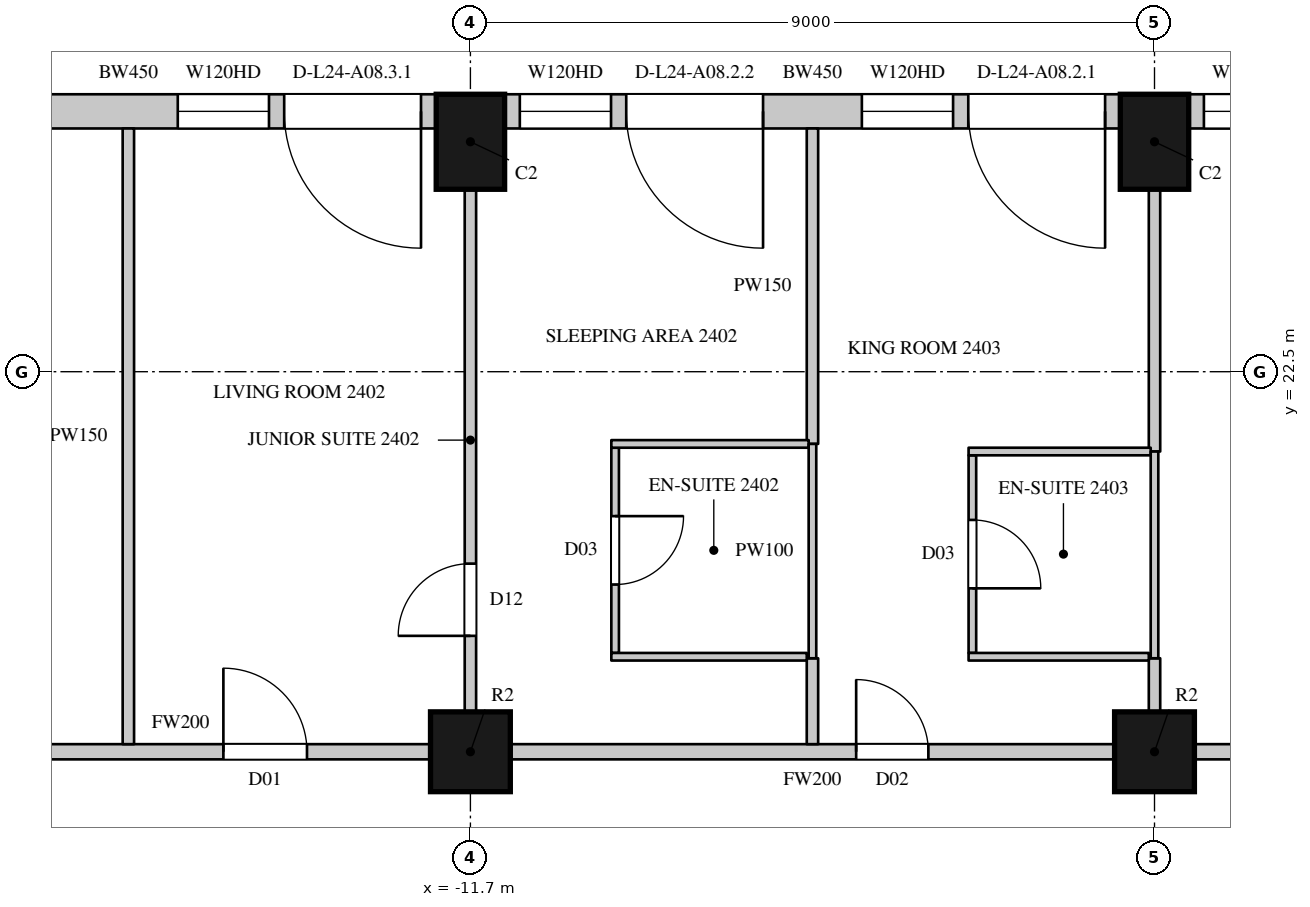
"""IFC4 building model, lengths in metres.
Left out: names, types, materials, properties, quantities, classifications, styles, units other than length and angle.
Written with IfcOpenShell. Run it as: python <this file> out.ifc"""

import sys

from ifc_helpers import new_model, si_unit, direction, frame, frame_2d, origin, origin_2d, place, context, subcontext, project, spatial, rectangle, circle, extrude, element, fill, save


model = new_model("IFC4")
c1 = context("Model", 3, precision=1e-05, world=origin(), true_north=direction((0.0, 1.0)))
c2 = subcontext(c1, "Body", "Model", "MODEL_VIEW")
j1 = project(units=[si_unit("LENGTHUNIT", "METRE"), si_unit("PLANEANGLEUNIT", "RADIAN")], contexts=[c1])
p1 = place(None, origin())
s1 = spatial("IfcSite", under=j1, at=p1, CompositionType="ELEMENT")
p2 = place(p1, origin())
s2 = spatial("IfcBuilding", under=s1, at=p2, CompositionType="ELEMENT")
p3 = place(p2, frame((0.0, 0.0, 116.7)))
s3 = spatial("IfcBuildingStorey", under=s2, at=p3, CompositionType="ELEMENT", Elevation=116.7)
for number, where, z_axis, x_axis in (
    (1, (-2.7, 25.525, 0.0), (0.0, 0.0, 1.0), (-1.0, 0.0, 0.0)),
    (2, (-11.7, 25.525, 0.0), (0.0, 0.0, 1.0), (-1.0, 0.0, 0.0)),
):
    element("IfcColumn", number, at=place(p3, frame(where, z_axis=z_axis, x_axis=x_axis)), inside=s3, PredefinedType="COLUMN", context=c2, shape_type="SweptSolid", body=[
        extrude(rectangle(XDim=0.9, YDim=1.25, at=origin_2d()), origin(), (0.0, 0.0, 1.0), 3.6),
    ])
for number, where, z_axis, x_axis in (
    (3, (-11.7, 17.5, 0.0), (0.0, 0.0, 1.0), (1.0, 0.0, 0.0)),
    (4, (-2.7, 17.5, 0.0), (0.0, 0.0, 1.0), (1.0, 0.0, 0.0)),
):
    element("IfcColumn", number, at=place(p3, frame(where, z_axis=z_axis, x_axis=x_axis)), inside=s3, PredefinedType="COLUMN", context=c2, shape_type="SweptSolid", body=[
        extrude(circle(Radius=0.525, at=origin_2d()), origin(), (0.0, 0.0, 1.0), 3.6),
    ])
p4 = place(p3, frame((5.85, 25.925, 0.0), z_axis=(0.0, 0.0, 1.0), x_axis=(-1.0, 0.0, 0.0)))
e5 = element("IfcWall", 5, at=p4, inside=s3, PredefinedType="SOLIDWALL", context=c2, shape_type="SweptSolid", body=[
    extrude(rectangle(XDim=8.1, YDim=0.45, at=frame_2d((4.05, 0.0))), origin(), (0.0, 0.0, 1.0), 3.3),
])
p5 = place(p4, frame((0.2, 0.0, 0.0)))
e6 = element("IfcOpeningElement", 6, at=p5, cuts=e5, PredefinedType="OPENING", context=c2, shape_type="SweptSolid", body=[
    extrude(rectangle(XDim=1.8, YDim=2.4, at=frame_2d((0.9, 1.2))), frame((0.0, 0.235, 0.0), z_axis=(0.0, -1.0, 0.0), x_axis=(1.0, 0.0, 0.0)), (0.0, 0.0, 1.0), 0.47),
])
p6 = place(p4, frame((2.2, 0.0, 1.05)))
e7 = element("IfcOpeningElement", 7, at=p6, cuts=e5, PredefinedType="OPENING", context=c2, shape_type="SweptSolid", body=[
    extrude(rectangle(XDim=1.2, YDim=2.0, at=frame_2d((0.6, 1.0))), frame((0.0, 0.235, 0.0), z_axis=(0.0, -1.0, 0.0), x_axis=(1.0, 0.0, 0.0)), (0.0, 0.0, 1.0), 0.47),
])
p7 = place(p4, frame((4.7, 0.0, 0.0)))
e8 = element("IfcOpeningElement", 8, at=p7, cuts=e5, PredefinedType="OPENING", context=c2, shape_type="SweptSolid", body=[
    extrude(rectangle(XDim=1.8, YDim=2.4, at=frame_2d((0.9, 1.2))), frame((0.0, 0.235, 0.0), z_axis=(0.0, -1.0, 0.0), x_axis=(1.0, 0.0, 0.0)), (0.0, 0.0, 1.0), 0.47),
])
p8 = place(p4, frame((6.7, 0.0, 1.05)))
e9 = element("IfcOpeningElement", 9, at=p8, cuts=e5, PredefinedType="OPENING", context=c2, shape_type="SweptSolid", body=[
    extrude(rectangle(XDim=1.2, YDim=2.0, at=frame_2d((0.6, 1.0))), frame((0.0, 0.235, 0.0), z_axis=(0.0, -1.0, 0.0), x_axis=(1.0, 0.0, 0.0)), (0.0, 0.0, 1.0), 0.47),
])
p9 = place(p3, frame((-3.15, 25.925, 0.0), z_axis=(0.0, 0.0, 1.0), x_axis=(-1.0, 0.0, 0.0)))
e10 = element("IfcWall", 10, at=p9, inside=s3, PredefinedType="SOLIDWALL", context=c2, shape_type="SweptSolid", body=[
    extrude(rectangle(XDim=8.1, YDim=0.45, at=frame_2d((4.05, 0.0))), origin(), (0.0, 0.0, 1.0), 3.3),
])
p10 = place(p9, frame((0.2, 0.0, 0.0)))
e11 = element("IfcOpeningElement", 11, at=p10, cuts=e10, PredefinedType="OPENING", context=c2, shape_type="SweptSolid", body=[
    extrude(rectangle(XDim=1.8, YDim=2.4, at=frame_2d((0.9, 1.2))), frame((0.0, 0.235, 0.0), z_axis=(0.0, -1.0, 0.0), x_axis=(1.0, 0.0, 0.0)), (0.0, 0.0, 1.0), 0.47),
])
p11 = place(p9, frame((2.2, 0.0, 1.05)))
e12 = element("IfcOpeningElement", 12, at=p11, cuts=e10, PredefinedType="OPENING", context=c2, shape_type="SweptSolid", body=[
    extrude(rectangle(XDim=1.2, YDim=2.0, at=frame_2d((0.6, 1.0))), frame((0.0, 0.235, 0.0), z_axis=(0.0, -1.0, 0.0), x_axis=(1.0, 0.0, 0.0)), (0.0, 0.0, 1.0), 0.47),
])
p12 = place(p9, frame((4.7, 0.0, 0.0)))
e13 = element("IfcOpeningElement", 13, at=p12, cuts=e10, PredefinedType="OPENING", context=c2, shape_type="SweptSolid", body=[
    extrude(rectangle(XDim=1.8, YDim=2.4, at=frame_2d((0.9, 1.2))), frame((0.0, 0.235, 0.0), z_axis=(0.0, -1.0, 0.0), x_axis=(1.0, 0.0, 0.0)), (0.0, 0.0, 1.0), 0.47),
])
p13 = place(p9, frame((6.7, 0.0, 1.05)))
e14 = element("IfcOpeningElement", 14, at=p13, cuts=e10, PredefinedType="OPENING", context=c2, shape_type="SweptSolid", body=[
    extrude(rectangle(XDim=1.2, YDim=2.0, at=frame_2d((0.6, 1.0))), frame((0.0, 0.235, 0.0), z_axis=(0.0, -1.0, 0.0), x_axis=(1.0, 0.0, 0.0)), (0.0, 0.0, 1.0), 0.47),
])
p14 = place(p3, frame((-12.15, 25.925, 0.0), z_axis=(0.0, 0.0, 1.0), x_axis=(-1.0, 0.0, 0.0)))
e15 = element("IfcWall", 15, at=p14, inside=s3, PredefinedType="SOLIDWALL", context=c2, shape_type="SweptSolid", body=[
    extrude(rectangle(XDim=8.1, YDim=0.45, at=frame_2d((4.05, 0.0))), origin(), (0.0, 0.0, 1.0), 3.3),
])
p15 = place(p14, frame((0.2, 0.0, 0.0)))
e16 = element("IfcOpeningElement", 16, at=p15, cuts=e15, PredefinedType="OPENING", context=c2, shape_type="SweptSolid", body=[
    extrude(rectangle(XDim=1.8, YDim=2.4, at=frame_2d((0.9, 1.2))), frame((0.0, 0.235, 0.0), z_axis=(0.0, -1.0, 0.0), x_axis=(1.0, 0.0, 0.0)), (0.0, 0.0, 1.0), 0.47),
])
p16 = place(p14, frame((2.2, 0.0, 1.05)))
e17 = element("IfcOpeningElement", 17, at=p16, cuts=e15, PredefinedType="OPENING", context=c2, shape_type="SweptSolid", body=[
    extrude(rectangle(XDim=1.2, YDim=2.0, at=frame_2d((0.6, 1.0))), frame((0.0, 0.235, 0.0), z_axis=(0.0, -1.0, 0.0), x_axis=(1.0, 0.0, 0.0)), (0.0, 0.0, 1.0), 0.47),
])
p17 = place(p14, frame((5.4, 0.0, 0.0)))
e18 = element("IfcOpeningElement", 18, at=p17, cuts=e15, PredefinedType="OPENING", context=c2, shape_type="SweptSolid", body=[
    extrude(rectangle(XDim=1.8, YDim=2.4, at=frame_2d((0.9, 1.2))), frame((0.0, 0.235, 0.0), z_axis=(0.0, -1.0, 0.0), x_axis=(1.0, 0.0, 0.0)), (0.0, 0.0, 1.0), 0.47),
])
p18 = place(p3, frame((-18.8, 17.5, 0.0), z_axis=(0.0, 0.0, 1.0), x_axis=(1.0, 0.0, 0.0)))
e19 = element("IfcWall", 19, at=p18, inside=s3, PredefinedType="PARTITIONING", context=c2, shape_type="SweptSolid", body=[
    extrude(rectangle(XDim=6.575, YDim=0.2, at=frame_2d((3.288, 0.0))), origin(), (0.0, 0.0, 1.0), 2.75),
])
p19 = place(p18, frame((3.85, 0.0, 0.0)))
e20 = element("IfcOpeningElement", 20, at=p19, cuts=e19, PredefinedType="OPENING", context=c2, shape_type="SweptSolid", body=[
    extrude(rectangle(XDim=1.1, YDim=2.4, at=frame_2d((0.55, 1.2))), frame((0.0, 0.11, 0.0), z_axis=(0.0, -1.0, 0.0), x_axis=(1.0, 0.0, 0.0)), (0.0, 0.0, 1.0), 0.22),
])
p20 = place(p3, frame((-11.175, 17.5, 0.0), z_axis=(0.0, 0.0, 1.0), x_axis=(1.0, 0.0, 0.0)))
e21 = element("IfcWall", 21, at=p20, inside=s3, PredefinedType="PARTITIONING", context=c2, shape_type="SweptSolid", body=[
    extrude(rectangle(XDim=7.95, YDim=0.2, at=frame_2d((3.975, 0.0))), origin(), (0.0, 0.0, 1.0), 2.75),
])
p21 = place(p20, frame((4.55, 0.0, 0.0)))
e22 = element("IfcOpeningElement", 22, at=p21, cuts=e21, PredefinedType="OPENING", context=c2, shape_type="SweptSolid", body=[
    extrude(rectangle(XDim=0.95, YDim=2.2, at=frame_2d((0.475, 1.1))), frame((0.0, 0.11, 0.0), z_axis=(0.0, -1.0, 0.0), x_axis=(1.0, 0.0, 0.0)), (0.0, 0.0, 1.0), 0.22),
])
p22 = place(p3, frame((-2.175, 17.5, 0.0), z_axis=(0.0, 0.0, 1.0), x_axis=(1.0, 0.0, 0.0)))
e23 = element("IfcWall", 23, at=p22, inside=s3, PredefinedType="PARTITIONING", context=c2, shape_type="SweptSolid", body=[
    extrude(rectangle(XDim=7.95, YDim=0.2, at=frame_2d((3.975, 0.0))), origin(), (0.0, 0.0, 1.0), 2.75),
])
p23 = place(p22, frame((1.65, 0.0, 0.0)))
e24 = element("IfcOpeningElement", 24, at=p23, cuts=e23, PredefinedType="OPENING", context=c2, shape_type="SweptSolid", body=[
    extrude(rectangle(XDim=1.1, YDim=2.4, at=frame_2d((0.55, 1.2))), frame((0.0, 0.11, 0.0), z_axis=(0.0, -1.0, 0.0), x_axis=(1.0, 0.0, 0.0)), (0.0, 0.0, 1.0), 0.22),
])
p24 = place(p3, frame((-16.2, 17.6, 0.0), z_axis=(0.0, 0.0, 1.0), x_axis=(0.0, 1.0, 0.0)))
e25 = element("IfcWall", 25, at=p24, inside=s3, PredefinedType="PARTITIONING", context=c2, shape_type="SweptSolid", body=[
    extrude(rectangle(XDim=8.1, YDim=0.15, at=frame_2d((4.05, 0.0))), origin(), (0.0, 0.0, 1.0), 2.65),
])
p25 = place(p3, frame((-11.7, 18.025, 0.0), z_axis=(0.0, 0.0, 1.0), x_axis=(0.0, 1.0, 0.0)))
e26 = element("IfcWall", 26, at=p25, inside=s3, PredefinedType="PARTITIONING", context=c2, shape_type="SweptSolid", body=[
    extrude(rectangle(XDim=6.875, YDim=0.15, at=frame_2d((3.438, 0.0))), origin(), (0.0, 0.0, 1.0), 2.75),
])
p26 = place(p25, frame((1.0, 0.0, 0.0)))
e27 = element("IfcOpeningElement", 27, at=p26, cuts=e26, PredefinedType="OPENING", context=c2, shape_type="SweptSolid", body=[
    extrude(rectangle(XDim=0.95, YDim=2.2, at=frame_2d((0.475, 1.1))), frame((0.0, 0.085, 0.0), z_axis=(0.0, -1.0, 0.0), x_axis=(1.0, 0.0, 0.0)), (0.0, 0.0, 1.0), 0.17),
])
p27 = place(p3, frame((-7.2, 17.6, 0.0), z_axis=(0.0, 0.0, 1.0), x_axis=(0.0, 1.0, 0.0)))
e28 = element("IfcWall", 28, at=p27, inside=s3, PredefinedType="PARTITIONING", context=c2, shape_type="SweptSolid", body=[
    extrude(rectangle(XDim=1.13, YDim=0.15, at=frame_2d((0.565, 0.0))), origin(), (0.0, 0.0, 1.0), 2.65),
])
p28 = place(p3, frame((-7.2, 21.55, 0.0), z_axis=(0.0, 0.0, 1.0), x_axis=(0.0, 1.0, 0.0)))
e29 = element("IfcWall", 29, at=p28, inside=s3, PredefinedType="PARTITIONING", context=c2, shape_type="SweptSolid", body=[
    extrude(rectangle(XDim=4.15, YDim=0.15, at=frame_2d((2.075, 0.0))), origin(), (0.0, 0.0, 1.0), 2.65),
])
p29 = place(p3, frame((-2.7, 18.025, 0.0), z_axis=(0.0, 0.0, 1.0), x_axis=(0.0, 1.0, 0.0)))
e30 = element("IfcWall", 30, at=p29, inside=s3, PredefinedType="PARTITIONING", context=c2, shape_type="SweptSolid", body=[
    extrude(rectangle(XDim=0.705, YDim=0.15, at=frame_2d((0.353, 0.0))), origin(), (0.0, 0.0, 1.0), 2.75),
])
p30 = place(p3, frame((-2.7, 21.45, 0.0), z_axis=(0.0, 0.0, 1.0), x_axis=(0.0, 1.0, 0.0)))
e31 = element("IfcWall", 31, at=p30, inside=s3, PredefinedType="PARTITIONING", context=c2, shape_type="SweptSolid", body=[
    extrude(rectangle(XDim=3.45, YDim=0.15, at=frame_2d((1.725, 0.0))), origin(), (0.0, 0.0, 1.0), 2.75),
])
p31 = place(p3, frame((-9.796, 18.8, 0.0), z_axis=(0.0, 0.0, 1.0), x_axis=(0.0, 1.0, 0.0)))
e32 = element("IfcWall", 32, at=p31, inside=s3, PredefinedType="PARTITIONING", context=c2, shape_type="SweptSolid", body=[
    extrude(rectangle(XDim=2.7, YDim=0.1, at=frame_2d((1.35, 0.0))), origin(), (0.0, 0.0, 1.0), 3.3),
])
p32 = place(p31, frame((0.9, 0.0, 0.0)))
e33 = element("IfcOpeningElement", 33, at=p32, cuts=e32, PredefinedType="OPENING", context=c2, shape_type="SweptSolid", body=[
    extrude(rectangle(XDim=0.9, YDim=2.2, at=frame_2d((0.45, 1.1))), frame((0.0, 0.06, 0.0), z_axis=(0.0, -1.0, 0.0), x_axis=(1.0, 0.0, 0.0)), (0.0, 0.0, 1.0), 0.12),
])
p33 = place(p3, frame((-9.846, 18.75, 0.0), z_axis=(0.0, 0.0, 1.0), x_axis=(1.0, 0.0, 0.0)))
e34 = element("IfcWall", 34, at=p33, inside=s3, PredefinedType="PARTITIONING", context=c2, shape_type="SweptSolid", body=[
    extrude(rectangle(XDim=2.571, YDim=0.1, at=frame_2d((1.286, 0.0))), origin(), (0.0, 0.0, 1.0), 3.3),
])
p34 = place(p3, frame((-9.846, 21.55, 0.0), z_axis=(0.0, 0.0, 1.0), x_axis=(1.0, 0.0, 0.0)))
e35 = element("IfcWall", 35, at=p34, inside=s3, PredefinedType="PARTITIONING", context=c2, shape_type="SweptSolid", body=[
    extrude(rectangle(XDim=2.596, YDim=0.1, at=frame_2d((1.298, 0.0))), origin(), (0.0, 0.0, 1.0), 3.3),
])
p35 = place(p3, frame((-7.2, 18.73, 0.0), z_axis=(0.0, 0.0, 1.0), x_axis=(0.0, 1.0, 0.0)))
e36 = element("IfcWall", 36, at=p35, inside=s3, PredefinedType="PARTITIONING", context=c2, shape_type="SweptSolid", body=[
    extrude(rectangle(XDim=2.82, YDim=0.1, at=frame_2d((1.41, 0.0))), origin(), (0.0, 0.0, 1.0), 2.65),
])
p36 = place(p3, frame((-5.096, 18.8, 0.0), z_axis=(0.0, 0.0, 1.0), x_axis=(0.0, 1.0, 0.0)))
e37 = element("IfcWall", 37, at=p36, inside=s3, PredefinedType="PARTITIONING", context=c2, shape_type="SweptSolid", body=[
    extrude(rectangle(XDim=2.6, YDim=0.1, at=frame_2d((1.3, 0.0))), origin(), (0.0, 0.0, 1.0), 3.3),
])
p37 = place(p36, frame((0.85, 0.0, 0.0)))
e38 = element("IfcOpeningElement", 38, at=p37, cuts=e37, PredefinedType="OPENING", context=c2, shape_type="SweptSolid", body=[
    extrude(rectangle(XDim=0.9, YDim=2.2, at=frame_2d((0.45, 1.1))), frame((0.0, 0.06, 0.0), z_axis=(0.0, -1.0, 0.0), x_axis=(1.0, 0.0, 0.0)), (0.0, 0.0, 1.0), 0.12),
])
p38 = place(p3, frame((-5.146, 18.75, 0.0), z_axis=(0.0, 0.0, 1.0), x_axis=(1.0, 0.0, 0.0)))
e39 = element("IfcWall", 39, at=p38, inside=s3, PredefinedType="PARTITIONING", context=c2, shape_type="SweptSolid", body=[
    extrude(rectangle(XDim=2.371, YDim=0.1, at=frame_2d((1.186, 0.0))), origin(), (0.0, 0.0, 1.0), 3.3),
])
p39 = place(p3, frame((-5.146, 21.45, 0.0), z_axis=(0.0, 0.0, 1.0), x_axis=(1.0, 0.0, 0.0)))
e40 = element("IfcWall", 40, at=p39, inside=s3, PredefinedType="PARTITIONING", context=c2, shape_type="SweptSolid", body=[
    extrude(rectangle(XDim=2.396, YDim=0.1, at=frame_2d((1.198, 0.0))), origin(), (0.0, 0.0, 1.0), 3.3),
])
p40 = place(p3, frame((-2.7, 18.73, 0.0), z_axis=(0.0, 0.0, 1.0), x_axis=(0.0, 1.0, 0.0)))
e41 = element("IfcWall", 41, at=p40, inside=s3, PredefinedType="PARTITIONING", context=c2, shape_type="SweptSolid", body=[
    extrude(rectangle(XDim=2.72, YDim=0.1, at=frame_2d((1.36, 0.0))), origin(), (0.0, 0.0, 1.0), 2.75),
])
p41 = place(p8, origin())
e42 = element("IfcWindow", 42, at=p41, inside=s3, PartitioningType="SINGLE_PANEL", PredefinedType="WINDOW", context=c2, shape_type="SweptSolid", body=[
    extrude(rectangle(XDim=1.2, YDim=2.0, at=frame_2d((0.6, 1.0))), frame((0.0, 0.135, 0.0), z_axis=(0.0, -1.0, 0.0), x_axis=(1.0, 0.0, 0.0)), (0.0, 0.0, 1.0), 0.06),
])
fill(e9, e42)
p42 = place(p10, origin())
e43 = element("IfcDoor", 43, at=p42, inside=s3, OperationType="SLIDING_TO_LEFT", PredefinedType="DOOR", context=c2, shape_type="SweptSolid", body=[
    extrude(rectangle(XDim=1.8, YDim=2.4, at=frame_2d((0.9, 1.2))), frame((0.0, 0.13, 0.0), z_axis=(0.0, -1.0, 0.0), x_axis=(1.0, 0.0, 0.0)), (0.0, 0.0, 1.0), 0.05),
])
fill(e11, e43)
p43 = place(p11, origin())
e44 = element("IfcWindow", 44, at=p43, inside=s3, PartitioningType="SINGLE_PANEL", PredefinedType="WINDOW", context=c2, shape_type="SweptSolid", body=[
    extrude(rectangle(XDim=1.2, YDim=2.0, at=frame_2d((0.6, 1.0))), frame((0.0, 0.135, 0.0), z_axis=(0.0, -1.0, 0.0), x_axis=(1.0, 0.0, 0.0)), (0.0, 0.0, 1.0), 0.06),
])
fill(e12, e44)
p44 = place(p12, origin())
e45 = element("IfcDoor", 45, at=p44, inside=s3, OperationType="SLIDING_TO_LEFT", PredefinedType="DOOR", context=c2, shape_type="SweptSolid", body=[
    extrude(rectangle(XDim=1.8, YDim=2.4, at=frame_2d((0.9, 1.2))), frame((0.0, 0.13, 0.0), z_axis=(0.0, -1.0, 0.0), x_axis=(1.0, 0.0, 0.0)), (0.0, 0.0, 1.0), 0.05),
])
fill(e13, e45)
p45 = place(p13, origin())
e46 = element("IfcWindow", 46, at=p45, inside=s3, PartitioningType="SINGLE_PANEL", PredefinedType="WINDOW", context=c2, shape_type="SweptSolid", body=[
    extrude(rectangle(XDim=1.2, YDim=2.0, at=frame_2d((0.6, 1.0))), frame((0.0, 0.135, 0.0), z_axis=(0.0, -1.0, 0.0), x_axis=(1.0, 0.0, 0.0)), (0.0, 0.0, 1.0), 0.06),
])
fill(e14, e46)
p46 = place(p15, origin())
e47 = element("IfcDoor", 47, at=p46, inside=s3, OperationType="SLIDING_TO_LEFT", PredefinedType="DOOR", context=c2, shape_type="SweptSolid", body=[
    extrude(rectangle(XDim=1.8, YDim=2.4, at=frame_2d((0.9, 1.2))), frame((0.0, 0.13, 0.0), z_axis=(0.0, -1.0, 0.0), x_axis=(1.0, 0.0, 0.0)), (0.0, 0.0, 1.0), 0.05),
])
fill(e16, e47)
p47 = place(p16, origin())
e48 = element("IfcWindow", 48, at=p47, inside=s3, PartitioningType="SINGLE_PANEL", PredefinedType="WINDOW", context=c2, shape_type="SweptSolid", body=[
    extrude(rectangle(XDim=1.2, YDim=2.0, at=frame_2d((0.6, 1.0))), frame((0.0, 0.135, 0.0), z_axis=(0.0, -1.0, 0.0), x_axis=(1.0, 0.0, 0.0)), (0.0, 0.0, 1.0), 0.06),
])
fill(e17, e48)
p48 = place(p19, origin())
e49 = element("IfcDoor", 49, at=p48, inside=s3, OperationType="SINGLE_SWING_LEFT", PredefinedType="DOOR", context=c2, shape_type="SweptSolid", body=[
    extrude(rectangle(XDim=1.1, YDim=2.4, at=frame_2d((0.55, 1.2))), frame((0.0, 0.025, 0.0), z_axis=(0.0, -1.0, 0.0), x_axis=(1.0, 0.0, 0.0)), (0.0, 0.0, 1.0), 0.05),
])
fill(e20, e49)
p49 = place(p26, origin())
e50 = element("IfcDoor", 50, at=p49, inside=s3, OperationType="SINGLE_SWING_LEFT", PredefinedType="DOOR", context=c2, shape_type="SweptSolid", body=[
    extrude(rectangle(XDim=0.95, YDim=2.2, at=frame_2d((0.475, 1.1))), frame((0.0, 0.025, 0.0), z_axis=(0.0, -1.0, 0.0), x_axis=(1.0, 0.0, 0.0)), (0.0, 0.0, 1.0), 0.05),
])
fill(e27, e50)
p50 = place(p32, origin())
e51 = element("IfcDoor", 51, at=p50, inside=s3, OperationType="SINGLE_SWING_LEFT", PredefinedType="DOOR", context=c2, shape_type="SweptSolid", body=[
    extrude(rectangle(XDim=0.9, YDim=2.2, at=frame_2d((0.45, 1.1))), frame((0.0, 0.025, 0.0), z_axis=(0.0, -1.0, 0.0), x_axis=(1.0, 0.0, 0.0)), (0.0, 0.0, 1.0), 0.05),
])
fill(e33, e51)
p51 = place(p21, origin())
e52 = element("IfcDoor", 52, at=p51, inside=s3, OperationType="SINGLE_SWING_LEFT", PredefinedType="DOOR", context=c2, shape_type="SweptSolid", body=[
    extrude(rectangle(XDim=0.95, YDim=2.2, at=frame_2d((0.475, 1.1))), frame((0.0, 0.025, 0.0), z_axis=(0.0, -1.0, 0.0), x_axis=(1.0, 0.0, 0.0)), (0.0, 0.0, 1.0), 0.05),
])
fill(e22, e52)
p52 = place(p37, origin())
e53 = element("IfcDoor", 53, at=p52, inside=s3, OperationType="SINGLE_SWING_RIGHT", PredefinedType="DOOR", context=c2, shape_type="SweptSolid", body=[
    extrude(rectangle(XDim=0.9, YDim=2.2, at=frame_2d((0.45, 1.1))), frame((0.0, 0.025, 0.0), z_axis=(0.0, -1.0, 0.0), x_axis=(1.0, 0.0, 0.0)), (0.0, 0.0, 1.0), 0.05),
])
fill(e38, e53)
save(model, sys.argv[1])
